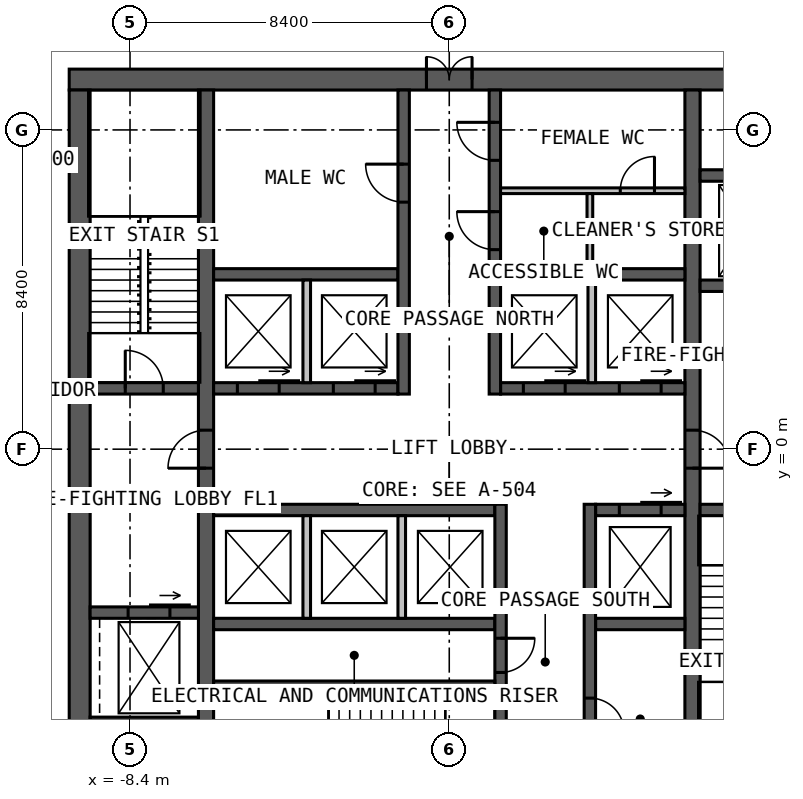
"""IFC4 building model, lengths in metres.
Left out: names, types, materials, properties, quantities, classifications, styles, units other than length and angle.
Written with IfcOpenShell. Run it as: python <this file> out.ifc"""

import sys

from ifc_helpers import new_model, si_unit, direction, frame, frame_2d, origin, place, context, subcontext, project, spatial, rectangle, extrude, element, fill, save


model = new_model("IFC4")
c1 = context("Model", 3, precision=1e-05, world=origin(), true_north=direction((0.0, 1.0)))
c2 = subcontext(c1, "Body", "Model", "MODEL_VIEW")
j1 = project(units=[si_unit("LENGTHUNIT", "METRE"), si_unit("PLANEANGLEUNIT", "RADIAN")], contexts=[c1])
p1 = place(None, origin())
s1 = spatial("IfcSite", under=j1, at=p1, CompositionType="ELEMENT")
p2 = place(p1, origin())
s2 = spatial("IfcBuilding", under=s1, at=p2, CompositionType="ELEMENT")
p3 = place(p2, frame((0.0, 0.0, 134.0)))
s3 = spatial("IfcBuildingStorey", under=s2, at=p3, CompositionType="ELEMENT", Elevation=134.0)
p4 = place(p3, frame((-10.0, 9.725, 0.0), z_axis=(0.0, 0.0, 1.0), x_axis=(1.0, 0.0, 0.0)))
e1 = element("IfcWall", 1, at=p4, inside=s3, PredefinedType="SOLIDWALL", context=c2, shape_type="SweptSolid", body=[
    extrude(rectangle(XDim=20.0, YDim=0.55, at=frame_2d((10.0, 0.0))), origin(), (0.0, 0.0, 1.0), 4.0),
])
p5 = place(p4, frame((9.4, 0.0, 0.0)))
e2 = element("IfcOpeningElement", 2, at=p5, cuts=e1, PredefinedType="OPENING", context=c2, shape_type="SweptSolid", body=[
    extrude(rectangle(XDim=1.2, YDim=2.2, at=frame_2d((0.6, 1.1))), frame((0.0, 0.285, 0.0), z_axis=(0.0, -1.0, 0.0), x_axis=(1.0, 0.0, 0.0)), (0.0, 0.0, 1.0), 0.57),
])
p6 = place(p3, frame((-9.725, 9.45, 0.0), z_axis=(0.0, 0.0, 1.0), x_axis=(0.0, -1.0, 0.0)))
e3 = element("IfcWall", 3, at=p6, inside=s3, PredefinedType="SOLIDWALL", context=c2, shape_type="SweptSolid", body=[
    extrude(rectangle(XDim=18.9, YDim=0.55, at=frame_2d((9.45, 0.0))), origin(), (0.0, 0.0, 1.0), 4.0),
])
p7 = place(p3, frame((-6.4, -9.45, 0.0), z_axis=(0.0, 0.0, 1.0), x_axis=(0.0, 1.0, 0.0)))
e4 = element("IfcWall", 4, at=p7, inside=s3, PredefinedType="SOLIDWALL", context=c2, shape_type="SweptSolid", body=[
    extrude(rectangle(XDim=18.9, YDim=0.4, at=frame_2d((9.45, 0.0))), origin(), (0.0, 0.0, 1.0), 4.0),
])
p8 = place(p7, frame((8.95, 0.0, 0.0)))
e5 = element("IfcOpeningElement", 5, at=p8, cuts=e4, PredefinedType="OPENING", context=c2, shape_type="SweptSolid", body=[
    extrude(rectangle(XDim=1.0, YDim=2.2, at=frame_2d((0.5, 1.1))), frame((0.0, 0.21, 0.0), z_axis=(0.0, -1.0, 0.0), x_axis=(1.0, 0.0, 0.0)), (0.0, 0.0, 1.0), 0.42),
])
p9 = place(p3, frame((6.4, 9.45, 0.0), z_axis=(0.0, 0.0, 1.0), x_axis=(0.0, -1.0, 0.0)))
e6 = element("IfcWall", 6, at=p9, inside=s3, PredefinedType="SOLIDWALL", context=c2, shape_type="SweptSolid", body=[
    extrude(rectangle(XDim=18.9, YDim=0.4, at=frame_2d((9.45, 0.0))), origin(), (0.0, 0.0, 1.0), 4.0),
])
p10 = place(p9, frame((8.95, 0.0, 0.0)))
e7 = element("IfcOpeningElement", 7, at=p10, cuts=e6, PredefinedType="OPENING", context=c2, shape_type="SweptSolid", body=[
    extrude(rectangle(XDim=1.0, YDim=2.2, at=frame_2d((0.5, 1.1))), frame((0.0, 0.21, 0.0), z_axis=(0.0, -1.0, 0.0), x_axis=(1.0, 0.0, 0.0)), (0.0, 0.0, 1.0), 0.42),
])
p11 = place(p3, frame((-6.2, 1.6, 0.0), z_axis=(0.0, 0.0, 1.0), x_axis=(1.0, 0.0, 0.0)))
e8 = element("IfcWall", 8, at=p11, inside=s3, PredefinedType="SOLIDWALL", context=c2, shape_type="SweptSolid", body=[
    extrude(rectangle(XDim=4.85, YDim=0.3, at=frame_2d((2.425, 0.0))), origin(), (0.0, 0.0, 1.0), 4.0),
])
p12 = place(p11, frame((0.625, 0.0, 0.0)))
e9 = element("IfcOpeningElement", 9, at=p12, cuts=e8, PredefinedType="OPENING", context=c2, shape_type="SweptSolid", body=[
    extrude(rectangle(XDim=1.1, YDim=2.2, at=frame_2d((0.55, 1.1))), frame((0.0, 0.16, 0.0), z_axis=(0.0, -1.0, 0.0), x_axis=(1.0, 0.0, 0.0)), (0.0, 0.0, 1.0), 0.32),
])
p13 = place(p11, frame((3.15, 0.0, 0.0)))
e10 = element("IfcOpeningElement", 10, at=p13, cuts=e8, PredefinedType="OPENING", context=c2, shape_type="SweptSolid", body=[
    extrude(rectangle(XDim=1.1, YDim=2.2, at=frame_2d((0.55, 1.1))), frame((0.0, 0.16, 0.0), z_axis=(0.0, -1.0, 0.0), x_axis=(1.0, 0.0, 0.0)), (0.0, 0.0, 1.0), 0.32),
])
p14 = place(p3, frame((1.35, 1.6, 0.0), z_axis=(0.0, 0.0, 1.0), x_axis=(1.0, 0.0, 0.0)))
e11 = element("IfcWall", 11, at=p14, inside=s3, PredefinedType="SOLIDWALL", context=c2, shape_type="SweptSolid", body=[
    extrude(rectangle(XDim=4.85, YDim=0.3, at=frame_2d((2.425, 0.0))), origin(), (0.0, 0.0, 1.0), 4.0),
])
p15 = place(p14, frame((0.6, 0.0, 0.0)))
e12 = element("IfcOpeningElement", 12, at=p15, cuts=e11, PredefinedType="OPENING", context=c2, shape_type="SweptSolid", body=[
    extrude(rectangle(XDim=1.1, YDim=2.2, at=frame_2d((0.55, 1.1))), frame((0.0, 0.16, 0.0), z_axis=(0.0, -1.0, 0.0), x_axis=(1.0, 0.0, 0.0)), (0.0, 0.0, 1.0), 0.32),
])
p16 = place(p14, frame((3.125, 0.0, 0.0)))
e13 = element("IfcOpeningElement", 13, at=p16, cuts=e11, PredefinedType="OPENING", context=c2, shape_type="SweptSolid", body=[
    extrude(rectangle(XDim=1.1, YDim=2.2, at=frame_2d((0.55, 1.1))), frame((0.0, 0.16, 0.0), z_axis=(0.0, -1.0, 0.0), x_axis=(1.0, 0.0, 0.0)), (0.0, 0.0, 1.0), 0.32),
])
for number, where, z_axis, x_axis in (
    (14, (-6.2, 4.6, 0.0), (0.0, 0.0, 1.0), (1.0, 0.0, 0.0)),
    (15, (1.35, 4.6, 0.0), (0.0, 0.0, 1.0), (1.0, 0.0, 0.0)),
):
    element("IfcWall", number, at=place(p3, frame(where, z_axis=z_axis, x_axis=x_axis)), inside=s3, PredefinedType="SOLIDWALL", context=c2, shape_type="SweptSolid", body=[
        extrude(rectangle(XDim=4.85, YDim=0.3, at=frame_2d((2.425, 0.0))), origin(), (0.0, 0.0, 1.0), 4.0),
    ])
p17 = place(p3, frame((-1.2, 1.45, 0.0), z_axis=(0.0, 0.0, 1.0), x_axis=(0.0, 1.0, 0.0)))
e16 = element("IfcWall", 16, at=p17, inside=s3, PredefinedType="SOLIDWALL", context=c2, shape_type="SweptSolid", body=[
    extrude(rectangle(XDim=8.0, YDim=0.3, at=frame_2d((4.0, 0.0))), origin(), (0.0, 0.0, 1.0), 4.0),
])
p18 = place(p17, frame((5.05, 0.0, 0.0)))
e17 = element("IfcOpeningElement", 17, at=p18, cuts=e16, PredefinedType="OPENING", context=c2, shape_type="SweptSolid", body=[
    extrude(rectangle(XDim=1.0, YDim=2.2, at=frame_2d((0.5, 1.1))), frame((0.0, 0.16, 0.0), z_axis=(0.0, -1.0, 0.0), x_axis=(1.0, 0.0, 0.0)), (0.0, 0.0, 1.0), 0.32),
])
p19 = place(p3, frame((1.2, 1.45, 0.0), z_axis=(0.0, 0.0, 1.0), x_axis=(0.0, 1.0, 0.0)))
e18 = element("IfcWall", 18, at=p19, inside=s3, PredefinedType="SOLIDWALL", context=c2, shape_type="SweptSolid", body=[
    extrude(rectangle(XDim=8.0, YDim=0.3, at=frame_2d((4.0, 0.0))), origin(), (0.0, 0.0, 1.0), 4.0),
])
p20 = place(p19, frame((3.8, 0.0, 0.0)))
e19 = element("IfcOpeningElement", 19, at=p20, cuts=e18, PredefinedType="OPENING", context=c2, shape_type="SweptSolid", body=[
    extrude(rectangle(XDim=1.0, YDim=2.2, at=frame_2d((0.5, 1.1))), frame((0.0, 0.16, 0.0), z_axis=(0.0, -1.0, 0.0), x_axis=(1.0, 0.0, 0.0)), (0.0, 0.0, 1.0), 0.32),
])
p21 = place(p19, frame((6.15, 0.0, 0.0)))
e20 = element("IfcOpeningElement", 20, at=p21, cuts=e18, PredefinedType="OPENING", context=c2, shape_type="SweptSolid", body=[
    extrude(rectangle(XDim=1.0, YDim=2.2, at=frame_2d((0.5, 1.1))), frame((0.0, 0.16, 0.0), z_axis=(0.0, -1.0, 0.0), x_axis=(1.0, 0.0, 0.0)), (0.0, 0.0, 1.0), 0.32),
])
p22 = place(p3, frame((-6.2, -1.6, 0.0), z_axis=(0.0, 0.0, 1.0), x_axis=(1.0, 0.0, 0.0)))
e21 = element("IfcWall", 21, at=p22, inside=s3, PredefinedType="SOLIDWALL", context=c2, shape_type="SweptSolid", body=[
    extrude(rectangle(XDim=7.4, YDim=0.3, at=frame_2d((3.7, 0.0))), origin(), (0.0, 0.0, 1.0), 4.0),
])
p23 = place(p3, frame((3.85, -1.6, 0.0), z_axis=(0.0, 0.0, 1.0), x_axis=(1.0, 0.0, 0.0)))
e22 = element("IfcWall", 22, at=p23, inside=s3, PredefinedType="SOLIDWALL", context=c2, shape_type="SweptSolid", body=[
    extrude(rectangle(XDim=2.35, YDim=0.3, at=frame_2d((1.175, 0.0))), origin(), (0.0, 0.0, 1.0), 4.0),
])
p24 = place(p23, frame((0.625, 0.0, 0.0)))
e23 = element("IfcOpeningElement", 23, at=p24, cuts=e22, PredefinedType="OPENING", context=c2, shape_type="SweptSolid", body=[
    extrude(rectangle(XDim=1.1, YDim=2.2, at=frame_2d((0.55, 1.1))), frame((0.0, 0.16, 0.0), z_axis=(0.0, -1.0, 0.0), x_axis=(1.0, 0.0, 0.0)), (0.0, 0.0, 1.0), 0.32),
])
p25 = place(p3, frame((-6.2, -4.6, 0.0), z_axis=(0.0, 0.0, 1.0), x_axis=(1.0, 0.0, 0.0)))
e24 = element("IfcWall", 24, at=p25, inside=s3, PredefinedType="SOLIDWALL", context=c2, shape_type="SweptSolid", body=[
    extrude(rectangle(XDim=7.4, YDim=0.3, at=frame_2d((3.7, 0.0))), origin(), (0.0, 0.0, 1.0), 4.0),
])
p26 = place(p3, frame((3.85, -4.6, 0.0), z_axis=(0.0, 0.0, 1.0), x_axis=(1.0, 0.0, 0.0)))
e25 = element("IfcWall", 25, at=p26, inside=s3, PredefinedType="SOLIDWALL", context=c2, shape_type="SweptSolid", body=[
    extrude(rectangle(XDim=2.35, YDim=0.3, at=frame_2d((1.175, 0.0))), origin(), (0.0, 0.0, 1.0), 4.0),
])
p27 = place(p3, frame((1.35, -1.45, 0.0), z_axis=(0.0, 0.0, 1.0), x_axis=(0.0, -1.0, 0.0)))
e26 = element("IfcWall", 26, at=p27, inside=s3, PredefinedType="SOLIDWALL", context=c2, shape_type="SweptSolid", body=[
    extrude(rectangle(XDim=8.0, YDim=0.3, at=frame_2d((4.0, 0.0))), origin(), (0.0, 0.0, 1.0), 4.0),
])
p28 = place(p27, frame((5.925, 0.0, 0.0)))
e27 = element("IfcOpeningElement", 27, at=p28, cuts=e26, PredefinedType="OPENING", context=c2, shape_type="SweptSolid", body=[
    extrude(rectangle(XDim=1.0, YDim=2.2, at=frame_2d((0.5, 1.1))), frame((0.0, 0.16, 0.0), z_axis=(0.0, -1.0, 0.0), x_axis=(1.0, 0.0, 0.0)), (0.0, 0.0, 1.0), 0.32),
])
p29 = place(p27, frame((3.525, 0.0, 0.0)))
e28 = element("IfcOpeningElement", 28, at=p29, cuts=e26, PredefinedType="OPENING", context=c2, shape_type="SweptSolid", body=[
    extrude(rectangle(XDim=0.9, YDim=2.2, at=frame_2d((0.45, 1.1))), frame((0.0, 0.16, 0.0), z_axis=(0.0, -1.0, 0.0), x_axis=(1.0, 0.0, 0.0)), (0.0, 0.0, 1.0), 0.32),
])
p30 = place(p3, frame((3.7, -1.45, 0.0), z_axis=(0.0, 0.0, 1.0), x_axis=(0.0, -1.0, 0.0)))
e29 = element("IfcWall", 29, at=p30, inside=s3, PredefinedType="SOLIDWALL", context=c2, shape_type="SweptSolid", body=[
    extrude(rectangle(XDim=8.0, YDim=0.3, at=frame_2d((4.0, 0.0))), origin(), (0.0, 0.0, 1.0), 4.0),
])
p31 = place(p30, frame((5.1, 0.0, 0.0)))
e30 = element("IfcOpeningElement", 30, at=p31, cuts=e29, PredefinedType="OPENING", context=c2, shape_type="SweptSolid", body=[
    extrude(rectangle(XDim=0.9, YDim=2.2, at=frame_2d((0.45, 1.1))), frame((0.0, 0.16, 0.0), z_axis=(0.0, -1.0, 0.0), x_axis=(1.0, 0.0, 0.0)), (0.0, 0.0, 1.0), 0.32),
])
p32 = place(p3, frame((-6.2, -6.2, 0.0), z_axis=(0.0, 0.0, 1.0), x_axis=(1.0, 0.0, 0.0)))
e31 = element("IfcWall", 31, at=p32, inside=s3, PredefinedType="SOLIDWALL", context=c2, shape_type="SweptSolid", body=[
    extrude(rectangle(XDim=7.4, YDim=0.2, at=frame_2d((3.7, 0.0))), origin(), (0.0, 0.0, 1.0), 4.0),
])
p33 = place(p3, frame((-9.45, 1.6, 0.0), z_axis=(0.0, 0.0, 1.0), x_axis=(1.0, 0.0, 0.0)))
e32 = element("IfcWall", 32, at=p33, inside=s3, PredefinedType="SOLIDWALL", context=c2, shape_type="SweptSolid", body=[
    extrude(rectangle(XDim=2.85, YDim=0.3, at=frame_2d((1.425, 0.0))), origin(), (0.0, 0.0, 1.0), 4.0),
])
p34 = place(p33, frame((0.925, 0.0, 0.0)))
e33 = element("IfcOpeningElement", 33, at=p34, cuts=e32, PredefinedType="OPENING", context=c2, shape_type="SweptSolid", body=[
    extrude(rectangle(XDim=1.0, YDim=2.2, at=frame_2d((0.5, 1.1))), frame((0.0, 0.16, 0.0), z_axis=(0.0, -1.0, 0.0), x_axis=(1.0, 0.0, 0.0)), (0.0, 0.0, 1.0), 0.32),
])
p35 = place(p3, frame((6.6, -1.6, 0.0), z_axis=(0.0, 0.0, 1.0), x_axis=(1.0, 0.0, 0.0)))
e34 = element("IfcWall", 34, at=p35, inside=s3, PredefinedType="SOLIDWALL", context=c2, shape_type="SweptSolid", body=[
    extrude(rectangle(XDim=2.85, YDim=0.3, at=frame_2d((1.425, 0.0))), origin(), (0.0, 0.0, 1.0), 4.0),
])
p36 = place(p35, frame((0.925, 0.0, 0.0)))
e35 = element("IfcOpeningElement", 35, at=p36, cuts=e34, PredefinedType="OPENING", context=c2, shape_type="SweptSolid", body=[
    extrude(rectangle(XDim=1.0, YDim=2.2, at=frame_2d((0.5, 1.1))), frame((0.0, 0.16, 0.0), z_axis=(0.0, -1.0, 0.0), x_axis=(1.0, 0.0, 0.0)), (0.0, 0.0, 1.0), 0.32),
])
p37 = place(p3, frame((-9.45, -4.3, 0.0), z_axis=(0.0, 0.0, 1.0), x_axis=(1.0, 0.0, 0.0)))
e36 = element("IfcWall", 36, at=p37, inside=s3, PredefinedType="SOLIDWALL", context=c2, shape_type="SweptSolid", body=[
    extrude(rectangle(XDim=2.85, YDim=0.3, at=frame_2d((1.425, 0.0))), origin(), (0.0, 0.0, 1.0), 4.0),
])
p38 = place(p37, frame((1.0, 0.0, 0.0)))
e37 = element("IfcOpeningElement", 37, at=p38, cuts=e36, PredefinedType="OPENING", context=c2, shape_type="SweptSolid", body=[
    extrude(rectangle(XDim=1.1, YDim=2.2, at=frame_2d((0.55, 1.1))), frame((0.0, 0.16, 0.0), z_axis=(0.0, -1.0, 0.0), x_axis=(1.0, 0.0, 0.0)), (0.0, 0.0, 1.0), 0.32),
])
p39 = place(p3, frame((6.6, 4.3, 0.0), z_axis=(0.0, 0.0, 1.0), x_axis=(1.0, 0.0, 0.0)))
e38 = element("IfcWall", 38, at=p39, inside=s3, PredefinedType="SOLIDWALL", context=c2, shape_type="SweptSolid", body=[
    extrude(rectangle(XDim=2.85, YDim=0.3, at=frame_2d((1.425, 0.0))), origin(), (0.0, 0.0, 1.0), 4.0),
])
p40 = place(p39, frame((0.75, 0.0, 0.0)))
e39 = element("IfcOpeningElement", 39, at=p40, cuts=e38, PredefinedType="OPENING", context=c2, shape_type="SweptSolid", body=[
    extrude(rectangle(XDim=1.1, YDim=2.2, at=frame_2d((0.55, 1.1))), frame((0.0, 0.16, 0.0), z_axis=(0.0, -1.0, 0.0), x_axis=(1.0, 0.0, 0.0)), (0.0, 0.0, 1.0), 0.32),
])
for number, where, z_axis, x_axis in (
    (40, (-9.45, -7.2, 0.0), (0.0, 0.0, 1.0), (1.0, 0.0, 0.0)),
    (41, (6.6, 7.2, 0.0), (0.0, 0.0, 1.0), (1.0, 0.0, 0.0)),
):
    element("IfcWall", number, at=place(p3, frame(where, z_axis=z_axis, x_axis=x_axis)), inside=s3, PredefinedType="SOLIDWALL", context=c2, shape_type="SweptSolid", body=[
        extrude(rectangle(XDim=2.85, YDim=0.3, at=frame_2d((1.425, 0.0))), origin(), (0.0, 0.0, 1.0), 4.0),
    ])
for number, where, z_axis, x_axis in (
    (42, (-3.75, 1.75, 0.0), (0.0, 0.0, 1.0), (0.0, 1.0, 0.0)),
    (43, (3.75, 1.75, 0.0), (0.0, 0.0, 1.0), (0.0, 1.0, 0.0)),
    (44, (-3.75, -1.75, 0.0), (0.0, 0.0, 1.0), (0.0, -1.0, 0.0)),
    (45, (-1.25, -1.75, 0.0), (0.0, 0.0, 1.0), (0.0, -1.0, 0.0)),
):
    element("IfcWall", number, at=place(p3, frame(where, z_axis=z_axis, x_axis=x_axis)), inside=s3, PredefinedType="SOLIDWALL", context=c2, shape_type="SweptSolid", body=[
        extrude(rectangle(XDim=2.7, YDim=0.2, at=frame_2d((1.35, 0.0))), origin(), (0.0, 0.0, 1.0), 3.75),
    ])
p41 = place(p3, frame((1.35, 6.8, 0.0), z_axis=(0.0, 0.0, 1.0), x_axis=(1.0, 0.0, 0.0)))
e46 = element("IfcWall", 46, at=p41, inside=s3, PredefinedType="PARTITIONING", context=c2, shape_type="SweptSolid", body=[
    extrude(rectangle(XDim=4.85, YDim=0.15, at=frame_2d((2.425, 0.0))), origin(), (0.0, 0.0, 1.0), 3.75),
])
p42 = place(p41, frame((3.15, 0.0, 0.0)))
e47 = element("IfcOpeningElement", 47, at=p42, cuts=e46, PredefinedType="OPENING", context=c2, shape_type="SweptSolid", body=[
    extrude(rectangle(XDim=0.9, YDim=2.2, at=frame_2d((0.45, 1.1))), frame((0.0, 0.085, 0.0), z_axis=(0.0, -1.0, 0.0), x_axis=(1.0, 0.0, 0.0)), (0.0, 0.0, 1.0), 0.17),
])
p43 = place(p3, frame((3.7, 4.75, 0.0), z_axis=(0.0, 0.0, 1.0), x_axis=(0.0, 1.0, 0.0)))
e48 = element("IfcWall", 48, at=p43, inside=s3, PredefinedType="PARTITIONING", context=c2, shape_type="SweptSolid", body=[
    extrude(rectangle(XDim=1.975, YDim=0.15, at=frame_2d((0.988, 0.0))), origin(), (0.0, 0.0, 1.0), 3.75),
])
p44 = place(p5, origin())
e49 = element("IfcDoor", 49, at=p44, inside=s3, OperationType="DOUBLE_DOOR_SINGLE_SWING", PredefinedType="DOOR", context=c2, shape_type="SweptSolid", body=[
    extrude(rectangle(XDim=1.2, YDim=2.2, at=frame_2d((0.6, 1.1))), frame((0.0, 0.025, 0.0), z_axis=(0.0, -1.0, 0.0), x_axis=(1.0, 0.0, 0.0)), (0.0, 0.0, 1.0), 0.05),
])
fill(e2, e49)
p45 = place(p8, origin())
e50 = element("IfcDoor", 50, at=p45, inside=s3, OperationType="SINGLE_SWING_LEFT", PredefinedType="DOOR", context=c2, shape_type="SweptSolid", body=[
    extrude(rectangle(XDim=1.0, YDim=2.2, at=frame_2d((0.5, 1.1))), frame((0.0, 0.025, 0.0), z_axis=(0.0, -1.0, 0.0), x_axis=(1.0, 0.0, 0.0)), (0.0, 0.0, 1.0), 0.05),
])
fill(e5, e50)
p46 = place(p10, origin())
e51 = element("IfcDoor", 51, at=p46, inside=s3, OperationType="SINGLE_SWING_RIGHT", PredefinedType="DOOR", context=c2, shape_type="SweptSolid", body=[
    extrude(rectangle(XDim=1.0, YDim=2.2, at=frame_2d((0.5, 1.1))), frame((0.0, 0.025, 0.0), z_axis=(0.0, -1.0, 0.0), x_axis=(1.0, 0.0, 0.0)), (0.0, 0.0, 1.0), 0.05),
])
fill(e7, e51)
p47 = place(p34, origin())
e52 = element("IfcDoor", 52, at=p47, inside=s3, OperationType="SINGLE_SWING_LEFT", PredefinedType="DOOR", context=c2, shape_type="SweptSolid", body=[
    extrude(rectangle(XDim=1.0, YDim=2.2, at=frame_2d((0.5, 1.1))), frame((0.0, 0.025, 0.0), z_axis=(0.0, -1.0, 0.0), x_axis=(1.0, 0.0, 0.0)), (0.0, 0.0, 1.0), 0.05),
])
fill(e33, e52)
p48 = place(p18, origin())
e53 = element("IfcDoor", 53, at=p48, inside=s3, OperationType="SINGLE_SWING_RIGHT", PredefinedType="DOOR", context=c2, shape_type="SweptSolid", body=[
    extrude(rectangle(XDim=1.0, YDim=2.2, at=frame_2d((0.5, 1.1))), frame((0.0, 0.025, 0.0), z_axis=(0.0, -1.0, 0.0), x_axis=(1.0, 0.0, 0.0)), (0.0, 0.0, 1.0), 0.05),
])
fill(e17, e53)
p49 = place(p20, origin())
e54 = element("IfcDoor", 54, at=p49, inside=s3, OperationType="SINGLE_SWING_RIGHT", PredefinedType="DOOR", context=c2, shape_type="SweptSolid", body=[
    extrude(rectangle(XDim=1.0, YDim=2.2, at=frame_2d((0.5, 1.1))), frame((0.0, 0.025, 0.0), z_axis=(0.0, -1.0, 0.0), x_axis=(1.0, 0.0, 0.0)), (0.0, 0.0, 1.0), 0.05),
])
fill(e19, e54)
p50 = place(p21, origin())
e55 = element("IfcDoor", 55, at=p50, inside=s3, OperationType="SINGLE_SWING_RIGHT", PredefinedType="DOOR", context=c2, shape_type="SweptSolid", body=[
    extrude(rectangle(XDim=1.0, YDim=2.2, at=frame_2d((0.5, 1.1))), frame((0.0, 0.025, 0.0), z_axis=(0.0, -1.0, 0.0), x_axis=(1.0, 0.0, 0.0)), (0.0, 0.0, 1.0), 0.05),
])
fill(e20, e55)
p51 = place(p29, origin())
e56 = element("IfcDoor", 56, at=p51, inside=s3, OperationType="SINGLE_SWING_LEFT", PredefinedType="DOOR", context=c2, shape_type="SweptSolid", body=[
    extrude(rectangle(XDim=0.9, YDim=2.2, at=frame_2d((0.45, 1.1))), frame((0.0, 0.025, 0.0), z_axis=(0.0, -1.0, 0.0), x_axis=(1.0, 0.0, 0.0)), (0.0, 0.0, 1.0), 0.05),
])
fill(e28, e56)
p52 = place(p31, origin())
e57 = element("IfcDoor", 57, at=p52, inside=s3, OperationType="SINGLE_SWING_RIGHT", PredefinedType="DOOR", context=c2, shape_type="SweptSolid", body=[
    extrude(rectangle(XDim=0.9, YDim=2.2, at=frame_2d((0.45, 1.1))), frame((0.0, 0.025, 0.0), z_axis=(0.0, -1.0, 0.0), x_axis=(1.0, 0.0, 0.0)), (0.0, 0.0, 1.0), 0.05),
])
fill(e30, e57)
p53 = place(p42, origin())
e58 = element("IfcDoor", 58, at=p53, inside=s3, OperationType="SINGLE_SWING_RIGHT", PredefinedType="DOOR", context=c2, shape_type="SweptSolid", body=[
    extrude(rectangle(XDim=0.9, YDim=2.2, at=frame_2d((0.45, 1.1))), frame((0.0, 0.025, 0.0), z_axis=(0.0, -1.0, 0.0), x_axis=(1.0, 0.0, 0.0)), (0.0, 0.0, 1.0), 0.05),
])
fill(e47, e58)
p54 = place(p12, origin())
e59 = element("IfcDoor", 59, at=p54, inside=s3, OperationType="SLIDING_TO_LEFT", PredefinedType="DOOR", context=c2, shape_type="SweptSolid", body=[
    extrude(rectangle(XDim=1.1, YDim=2.2, at=frame_2d((0.55, 1.1))), frame((0.0, 0.025, 0.0), z_axis=(0.0, -1.0, 0.0), x_axis=(1.0, 0.0, 0.0)), (0.0, 0.0, 1.0), 0.05),
])
fill(e9, e59)
p55 = place(p13, origin())
e60 = element("IfcDoor", 60, at=p55, inside=s3, OperationType="SLIDING_TO_LEFT", PredefinedType="DOOR", context=c2, shape_type="SweptSolid", body=[
    extrude(rectangle(XDim=1.1, YDim=2.2, at=frame_2d((0.55, 1.1))), frame((0.0, 0.025, 0.0), z_axis=(0.0, -1.0, 0.0), x_axis=(1.0, 0.0, 0.0)), (0.0, 0.0, 1.0), 0.05),
])
fill(e10, e60)
p56 = place(p15, origin())
e61 = element("IfcDoor", 61, at=p56, inside=s3, OperationType="SLIDING_TO_LEFT", PredefinedType="DOOR", context=c2, shape_type="SweptSolid", body=[
    extrude(rectangle(XDim=1.1, YDim=2.2, at=frame_2d((0.55, 1.1))), frame((0.0, 0.025, 0.0), z_axis=(0.0, -1.0, 0.0), x_axis=(1.0, 0.0, 0.0)), (0.0, 0.0, 1.0), 0.05),
])
fill(e12, e61)
p57 = place(p16, origin())
e62 = element("IfcDoor", 62, at=p57, inside=s3, OperationType="SLIDING_TO_LEFT", PredefinedType="DOOR", context=c2, shape_type="SweptSolid", body=[
    extrude(rectangle(XDim=1.1, YDim=2.2, at=frame_2d((0.55, 1.1))), frame((0.0, 0.025, 0.0), z_axis=(0.0, -1.0, 0.0), x_axis=(1.0, 0.0, 0.0)), (0.0, 0.0, 1.0), 0.05),
])
fill(e13, e62)
p58 = place(p24, origin())
e63 = element("IfcDoor", 63, at=p58, inside=s3, OperationType="SLIDING_TO_LEFT", PredefinedType="DOOR", context=c2, shape_type="SweptSolid", body=[
    extrude(rectangle(XDim=1.1, YDim=2.2, at=frame_2d((0.55, 1.1))), frame((0.0, 0.025, 0.0), z_axis=(0.0, -1.0, 0.0), x_axis=(1.0, 0.0, 0.0)), (0.0, 0.0, 1.0), 0.05),
])
fill(e23, e63)
p59 = place(p38, origin())
e64 = element("IfcDoor", 64, at=p59, inside=s3, OperationType="SLIDING_TO_LEFT", PredefinedType="DOOR", context=c2, shape_type="SweptSolid", body=[
    extrude(rectangle(XDim=1.1, YDim=2.2, at=frame_2d((0.55, 1.1))), frame((0.0, 0.025, 0.0), z_axis=(0.0, -1.0, 0.0), x_axis=(1.0, 0.0, 0.0)), (0.0, 0.0, 1.0), 0.05),
])
fill(e37, e64)
save(model, sys.argv[1])
